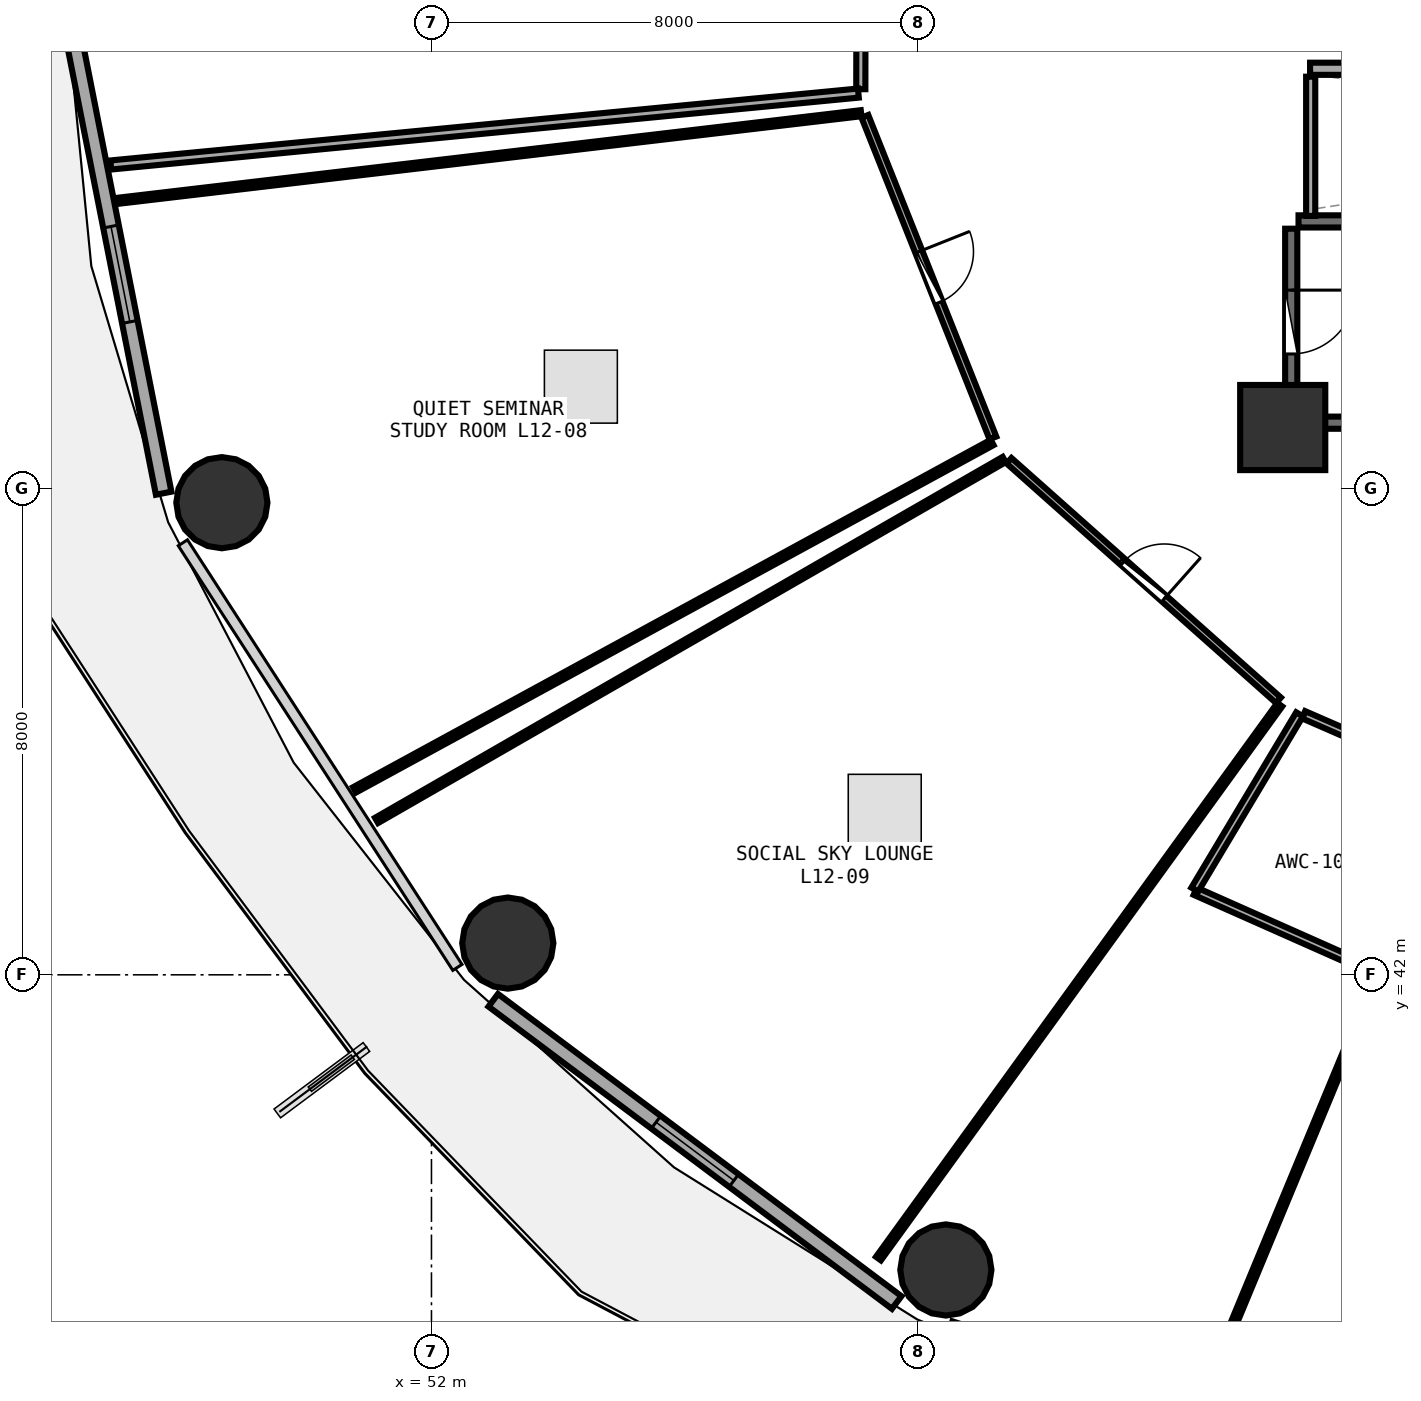
"""IFC4 building model, lengths in metres.
Left out: names, types, materials, properties, quantities, classifications, styles, units other than length and angle.
Written with IfcOpenShell. Run it as: python <this file> out.ifc"""

import sys

from ifc_helpers import new_model, si_unit, direction, frame, frame_2d, origin, origin_2d, place, context, subcontext, project, spatial, rectangle, circle, extrude, element, fill, save


model = new_model("IFC4")
c1 = context("Model", 3, precision=1e-05, world=origin(), true_north=direction((0.0, 1.0)))
c2 = subcontext(c1, "Body", "Model", "MODEL_VIEW")
j1 = project(units=[si_unit("LENGTHUNIT", "METRE"), si_unit("PLANEANGLEUNIT", "RADIAN")], contexts=[c1])
p1 = place(None, origin())
s1 = spatial("IfcSite", under=j1, at=p1, CompositionType="ELEMENT")
p2 = place(p1, origin())
s2 = spatial("IfcBuilding", under=s1, at=p2, CompositionType="ELEMENT")
p3 = place(p2, frame((0.0, 0.0, 48.75)))
s3 = spatial("IfcBuildingStorey", under=s2, at=p3, CompositionType="ELEMENT", Elevation=48.75)
p4 = place(p3, frame((66.0, 51.0, 0.0), z_axis=(0.0, 0.0, 1.0), x_axis=(1.0, 0.0, 0.0)))
e1 = element("IfcColumn", 1, at=p4, inside=s3, PredefinedType="PILASTER", context=c2, shape_type="SweptSolid", body=[
    extrude(rectangle(XDim=1.4, YDim=1.4, at=origin_2d()), origin(), (0.0, 0.0, 1.0), 3.75),
])
for number, where, z_axis, x_axis in (
    (2, (48.553, 49.764, 0.0), (0.0, 0.0, 1.0), (1.0, 0.0, 0.0)),
    (3, (53.256, 42.522, 0.0), (0.0, 0.0, 1.0), (1.0, 0.0, 0.0)),
    (4, (60.46, 37.146, 0.0), (0.0, 0.0, 1.0), (1.0, 0.0, 0.0)),
):
    element("IfcColumn", number, at=place(p3, frame(where, z_axis=z_axis, x_axis=x_axis)), inside=s3, PredefinedType="COLUMN", context=c2, shape_type="SweptSolid", body=[
        extrude(circle(Radius=0.75, at=origin_2d()), origin(), (0.0, 0.0, 1.0), 3.75),
    ])
p5 = place(p3, frame((46.104, 57.477, 0.0), z_axis=(0.0, 0.0, 1.0), x_axis=(0.193726159581, -0.98105564322, 0.0)))
e5 = element("IfcWall", 5, at=p5, inside=s3, PredefinedType="SOLIDWALL", context=c2, shape_type="SweptSolid", body=[
    extrude(rectangle(XDim=7.703, YDim=0.26, at=frame_2d((3.851, 0.0))), origin(), (0.0, 0.0, 1.0), 3.475),
])
p6 = place(p5, frame((3.231, 0.0, 0.85)))
e6 = element("IfcOpeningElement", 6, at=p6, cuts=e5, PredefinedType="OPENING", context=c2, shape_type="SweptSolid", body=[
    extrude(rectangle(XDim=1.6, YDim=1.45, at=frame_2d((0.8, 0.725))), frame((0.0, 0.14, 0.0), z_axis=(0.0, -1.0, 0.0), x_axis=(1.0, 0.0, 0.0)), (0.0, 0.0, 1.0), 0.28),
])
p7 = place(p3, frame((53.016, 41.582, 0.0), z_axis=(0.0, 0.0, 1.0), x_axis=(0.80030733173, -0.599590005569, 0.0)))
e7 = element("IfcWall", 7, at=p7, inside=s3, PredefinedType="SOLIDWALL", context=c2, shape_type="SweptSolid", body=[
    extrude(rectangle(XDim=8.291, YDim=0.26, at=frame_2d((4.145, 0.0))), origin(), (0.0, 0.0, 1.0), 3.475),
])
p8 = place(p7, frame((3.345, 0.0, 0.85)))
e8 = element("IfcOpeningElement", 8, at=p8, cuts=e7, PredefinedType="OPENING", context=c2, shape_type="SweptSolid", body=[
    extrude(rectangle(XDim=1.6, YDim=1.45, at=frame_2d((0.8, 0.725))), frame((0.0, 0.14, 0.0), z_axis=(0.0, -1.0, 0.0), x_axis=(1.0, 0.0, 0.0)), (0.0, 0.0, 1.0), 0.28),
])
p9 = place(p3, frame((60.526, 36.178, 0.0), z_axis=(0.0, 0.0, 1.0), x_axis=(0.951039914291, -0.309068085421, 0.0)))
e9 = element("IfcWall", 9, at=p9, inside=s3, PredefinedType="SOLIDWALL", context=c2, shape_type="SweptSolid", body=[
    extrude(rectangle(XDim=8.594, YDim=0.26, at=frame_2d((4.297, 0.0))), origin(), (0.0, 0.0, 1.0), 3.475),
])
p10 = place(p9, frame((4.577, 0.0, 0.85)))
e10 = element("IfcOpeningElement", 10, at=p10, cuts=e9, PredefinedType="OPENING", context=c2, shape_type="SweptSolid", body=[
    extrude(rectangle(XDim=1.6, YDim=1.45, at=frame_2d((0.8, 0.725))), frame((0.0, 0.14, 0.0), z_axis=(0.0, -1.0, 0.0), x_axis=(1.0, 0.0, 0.0)), (0.0, 0.0, 1.0), 0.28),
])
for number, where, z_axis, x_axis in (
    (11, (66.26, 51.08, 0.0), (0.0, 0.0, 1.0), (1.0, 0.0, 0.0)),
    (12, (73.42, 54.39, 0.0), (0.0, 0.0, 1.0), (-1.0, 0.0, 0.0)),
):
    element("IfcWall", number, at=place(p3, frame(where, z_axis=z_axis, x_axis=x_axis)), inside=s3, PredefinedType="SHEAR", context=c2, shape_type="SweptSolid", body=[
        extrude(rectangle(XDim=7.16, YDim=0.2, at=frame_2d((3.58, 0.0))), origin(), (0.0, 0.0, 1.0), 3.49),
    ])
p11 = place(p3, frame((66.14, 54.27, 0.0), z_axis=(0.0, 0.0, 1.0), x_axis=(0.0, -1.0, 0.0)))
e13 = element("IfcWall", 13, at=p11, inside=s3, PredefinedType="SHEAR", context=c2, shape_type="SweptSolid", body=[
    extrude(rectangle(XDim=3.07, YDim=0.2, at=frame_2d((1.535, 0.0))), origin(), (0.0, 0.0, 1.0), 3.49),
])
p12 = place(p11, frame((1.01, 0.0, 0.0)))
e14 = element("IfcOpeningElement", 14, at=p12, cuts=e13, PredefinedType="OPENING", context=c2, shape_type="SweptSolid", body=[
    extrude(rectangle(XDim=1.05, YDim=2.1, at=frame_2d((0.525, 1.05))), frame((0.0, 0.11, 0.0), z_axis=(0.0, -1.0, 0.0), x_axis=(1.0, 0.0, 0.0)), (0.0, 0.0, 1.0), 0.22),
])
p13 = place(p3, frame((66.45, 56.9, 0.0), z_axis=(0.0, 0.0, 1.0), x_axis=(1.0, 0.0, 0.0)))
e15 = element("IfcWall", 15, at=p13, inside=s3, PredefinedType="SOLIDWALL", context=c2, shape_type="SweptSolid", body=[
    extrude(rectangle(XDim=14.4, YDim=0.2, at=frame_2d((7.2, 0.0))), origin(), (0.0, 0.0, 1.0), 3.48),
])
p14 = place(p3, frame((66.46, 54.48, 0.0), z_axis=(0.0, 0.0, 1.0), x_axis=(0.0, 1.0, 0.0)))
e16 = element("IfcWall", 16, at=p14, inside=s3, PredefinedType="PARTITIONING", context=c2, shape_type="SweptSolid", body=[
    extrude(rectangle(XDim=2.29, YDim=0.15, at=frame_2d((1.145, 0.0))), origin(), (0.0, 0.0, 1.0), 3.48),
])
p15 = place(p3, frame((59.066, 59.475, 0.0), z_axis=(0.0, 0.0, 1.0), x_axis=(-0.001677287141, -0.999998593353, 0.0)))
e17 = element("IfcWall", 17, at=p15, inside=s3, PredefinedType="PARTITIONING", context=c2, shape_type="SweptSolid", body=[
    extrude(rectangle(XDim=2.911, YDim=0.15, at=frame_2d((1.456, 0.0))), origin(), (0.0, 0.0, 1.0), 2.875),
])
p16 = place(p15, frame((0.981, 0.0, 0.0)))
e18 = element("IfcOpeningElement", 18, at=p16, cuts=e17, PredefinedType="OPENING", context=c2, shape_type="SweptSolid", body=[
    extrude(rectangle(XDim=0.95, YDim=2.08, at=frame_2d((0.475, 1.04))), frame((0.0, 0.085, 0.0), z_axis=(0.0, -1.0, 0.0), x_axis=(1.0, 0.0, 0.0)), (0.0, 0.0, 1.0), 0.17),
])
p17 = place(p3, frame((59.128, 56.118, 0.0), z_axis=(0.0, 0.0, 1.0), x_axis=(0.369903929858, -0.929070009566, 0.0)))
e19 = element("IfcWall", 19, at=p17, inside=s3, PredefinedType="PARTITIONING", context=c2, shape_type="SweptSolid", body=[
    extrude(rectangle(XDim=5.693, YDim=0.12, at=frame_2d((2.846, 0.0))), origin(), (0.0, 0.0, 1.0), 2.875),
])
p18 = place(p17, frame((2.396, 0.0, 0.0)))
e20 = element("IfcOpeningElement", 20, at=p18, cuts=e19, PredefinedType="OPENING", context=c2, shape_type="SweptSolid", body=[
    extrude(rectangle(XDim=0.9, YDim=2.08, at=frame_2d((0.45, 1.04))), frame((0.0, 0.07, 0.0), z_axis=(0.0, -1.0, 0.0), x_axis=(1.0, 0.0, 0.0)), (0.0, 0.0, 1.0), 0.14),
])
p19 = place(p3, frame((61.499, 50.454, 0.0), z_axis=(0.0, 0.0, 1.0), x_axis=(0.747393415848, -0.664381729089, 0.0)))
e21 = element("IfcWall", 21, at=p19, inside=s3, PredefinedType="PARTITIONING", context=c2, shape_type="SweptSolid", body=[
    extrude(rectangle(XDim=5.929, YDim=0.12, at=frame_2d((2.965, 0.0))), origin(), (0.0, 0.0, 1.0), 2.875),
])
p20 = place(p19, frame((2.515, 0.0, 0.0)))
e22 = element("IfcOpeningElement", 22, at=p20, cuts=e21, PredefinedType="OPENING", context=c2, shape_type="SweptSolid", body=[
    extrude(rectangle(XDim=0.9, YDim=2.08, at=frame_2d((0.45, 1.04))), frame((0.0, 0.07, 0.0), z_axis=(0.0, -1.0, 0.0), x_axis=(1.0, 0.0, 0.0)), (0.0, 0.0, 1.0), 0.14),
])
p21 = place(p3, frame((66.343, 46.277, 0.0), z_axis=(0.0, 0.0, 1.0), x_axis=(0.916688793476, -0.399601871763, 0.0)))
e23 = element("IfcWall", 23, at=p21, inside=s3, PredefinedType="PLUMBINGWALL", context=c2, shape_type="SweptSolid", body=[
    extrude(rectangle(XDim=2.558, YDim=0.13, at=frame_2d((1.279, 0.0))), origin(), (0.0, 0.0, 1.0), 2.875),
])
p22 = place(p21, frame((0.849, 0.0, 0.0)))
e24 = element("IfcOpeningElement", 24, at=p22, cuts=e23, PredefinedType="OPENING", context=c2, shape_type="SweptSolid", body=[
    extrude(rectangle(XDim=0.86, YDim=2.05, at=frame_2d((0.43, 1.025))), frame((0.0, 0.075, 0.0), z_axis=(0.0, -1.0, 0.0), x_axis=(1.0, 0.0, 0.0)), (0.0, 0.0, 1.0), 0.15),
])
p23 = place(p3, frame((59.021, 56.5, 0.0), z_axis=(0.0, 0.0, 1.0), x_axis=(-0.995408087514, -0.095722198638, 0.0)))
e25 = element("IfcWall", 25, at=p23, inside=s3, PredefinedType="PARTITIONING", context=c2, shape_type="SweptSolid", body=[
    extrude(rectangle(XDim=12.352, YDim=0.15, at=frame_2d((6.176, 0.0))), origin(), (0.0, 0.0, 1.0), 2.875),
])
p24 = place(p3, frame((61.221, 50.755, 0.0), z_axis=(0.0, 0.0, 1.0), x_axis=(-0.878114235828, -0.478451030761, 0.0)))
e26 = element("IfcWall", 26, at=p24, inside=s3, PredefinedType="PARTITIONING", context=c2, shape_type="SweptSolid", body=[
    extrude(rectangle(XDim=11.942, YDim=0.1, at=frame_2d((5.971, 0.0))), origin(), (0.0, 0.0, 1.0), 2.875),
])
p25 = place(p3, frame((46.808, 54.725, 0.0), z_axis=(0.0, 0.0, 1.0), x_axis=(0.993128309916, 0.117030594475, 0.0)))
e27 = element("IfcWall", 27, at=p25, inside=s3, PredefinedType="PARTITIONING", context=c2, shape_type="SweptSolid", body=[
    extrude(rectangle(XDim=12.344, YDim=0.1, at=frame_2d((6.172, 0.0))), origin(), (0.0, 0.0, 1.0), 2.875),
])
p26 = place(p3, frame((65.951, 46.443, 0.0), z_axis=(0.0, 0.0, 1.0), x_axis=(-0.586718941426, -0.809790641939, 0.0)))
e28 = element("IfcWall", 28, at=p26, inside=s3, PredefinedType="PARTITIONING", context=c2, shape_type="SweptSolid", body=[
    extrude(rectangle(XDim=11.249, YDim=0.1, at=frame_2d((5.625, 0.0))), origin(), (0.0, 0.0, 1.0), 2.875),
])
p27 = place(p3, frame((51.097, 44.539, 0.0), z_axis=(0.0, 0.0, 1.0), x_axis=(0.866911397605, 0.498462264071, 0.0)))
e29 = element("IfcWall", 29, at=p27, inside=s3, PredefinedType="PARTITIONING", context=c2, shape_type="SweptSolid", body=[
    extrude(rectangle(XDim=11.907, YDim=0.1, at=frame_2d((5.954, 0.0))), origin(), (0.0, 0.0, 1.0), 2.875),
])
p28 = place(p3, frame((67.536, 42.054, 0.0), z_axis=(0.0, 0.0, 1.0), x_axis=(-0.913941429535, 0.405846108002, 0.0)))
e30 = element("IfcWall", 30, at=p28, inside=s3, PredefinedType="PLUMBINGWALL", context=c2, shape_type="SweptSolid", body=[
    extrude(rectangle(XDim=3.254, YDim=0.13, at=frame_2d((1.627, 0.0))), origin(), (0.0, 0.0, 1.0), 3.48),
])
p29 = place(p3, frame((64.553, 43.4, 0.0), z_axis=(0.0, 0.0, 1.0), x_axis=(0.513234244366, 0.858248571458, 0.0)))
e31 = element("IfcWall", 31, at=p29, inside=s3, PredefinedType="PLUMBINGWALL", context=c2, shape_type="SweptSolid", body=[
    extrude(rectangle(XDim=3.36, YDim=0.13, at=frame_2d((1.68, 0.0))), origin(), (0.0, 0.0, 1.0), 3.235),
])
p30 = place(p3, frame((64.673, 35.015, 0.0), z_axis=(0.0, 0.0, 1.0), x_axis=(0.383188399733, 0.923670206464, 0.0)))
e32 = element("IfcWall", 32, at=p30, inside=s3, PredefinedType="PARTITIONING", context=c2, shape_type="SweptSolid", body=[
    extrude(rectangle(XDim=7.619, YDim=0.1, at=frame_2d((3.81, 0.0))), origin(), (0.0, 0.0, 1.0), 2.875),
])
p31 = place(p6, origin())
e33 = element("IfcWindow", 33, at=p31, inside=s3, PartitioningType="SINGLE_PANEL", PredefinedType="WINDOW", context=c2, shape_type="SweptSolid", body=[
    extrude(rectangle(XDim=1.6, YDim=1.45, at=frame_2d((0.8, 0.725))), frame((0.0, 0.03, 0.0), z_axis=(0.0, -1.0, 0.0), x_axis=(1.0, 0.0, 0.0)), (0.0, 0.0, 1.0), 0.06),
])
fill(e6, e33)
p32 = place(p8, origin())
e34 = element("IfcWindow", 34, at=p32, inside=s3, PartitioningType="SINGLE_PANEL", PredefinedType="WINDOW", context=c2, shape_type="SweptSolid", body=[
    extrude(rectangle(XDim=1.6, YDim=1.45, at=frame_2d((0.8, 0.725))), frame((0.0, 0.03, 0.0), z_axis=(0.0, -1.0, 0.0), x_axis=(1.0, 0.0, 0.0)), (0.0, 0.0, 1.0), 0.06),
])
fill(e8, e34)
p33 = place(p12, origin())
e35 = element("IfcDoor", 35, at=p33, inside=s3, OperationType="SINGLE_SWING_LEFT", PredefinedType="DOOR", context=c2, shape_type="SweptSolid", body=[
    extrude(rectangle(XDim=1.05, YDim=2.1, at=frame_2d((0.525, 1.05))), frame((0.0, 0.025, 0.0), z_axis=(0.0, -1.0, 0.0), x_axis=(1.0, 0.0, 0.0)), (0.0, 0.0, 1.0), 0.05),
])
fill(e14, e35)
p34 = place(p18, origin())
e36 = element("IfcDoor", 36, at=p34, inside=s3, OperationType="SINGLE_SWING_LEFT", PredefinedType="DOOR", context=c2, shape_type="SweptSolid", body=[
    extrude(rectangle(XDim=0.9, YDim=2.08, at=frame_2d((0.45, 1.04))), frame((0.0, 0.025, 0.0), z_axis=(0.0, -1.0, 0.0), x_axis=(1.0, 0.0, 0.0)), (0.0, 0.0, 1.0), 0.05),
])
fill(e20, e36)
p35 = place(p20, origin())
e37 = element("IfcDoor", 37, at=p35, inside=s3, OperationType="SINGLE_SWING_RIGHT", PredefinedType="DOOR", context=c2, shape_type="SweptSolid", body=[
    extrude(rectangle(XDim=0.9, YDim=2.08, at=frame_2d((0.45, 1.04))), frame((0.0, 0.025, 0.0), z_axis=(0.0, -1.0, 0.0), x_axis=(1.0, 0.0, 0.0)), (0.0, 0.0, 1.0), 0.05),
])
fill(e22, e37)
save(model, sys.argv[1])
